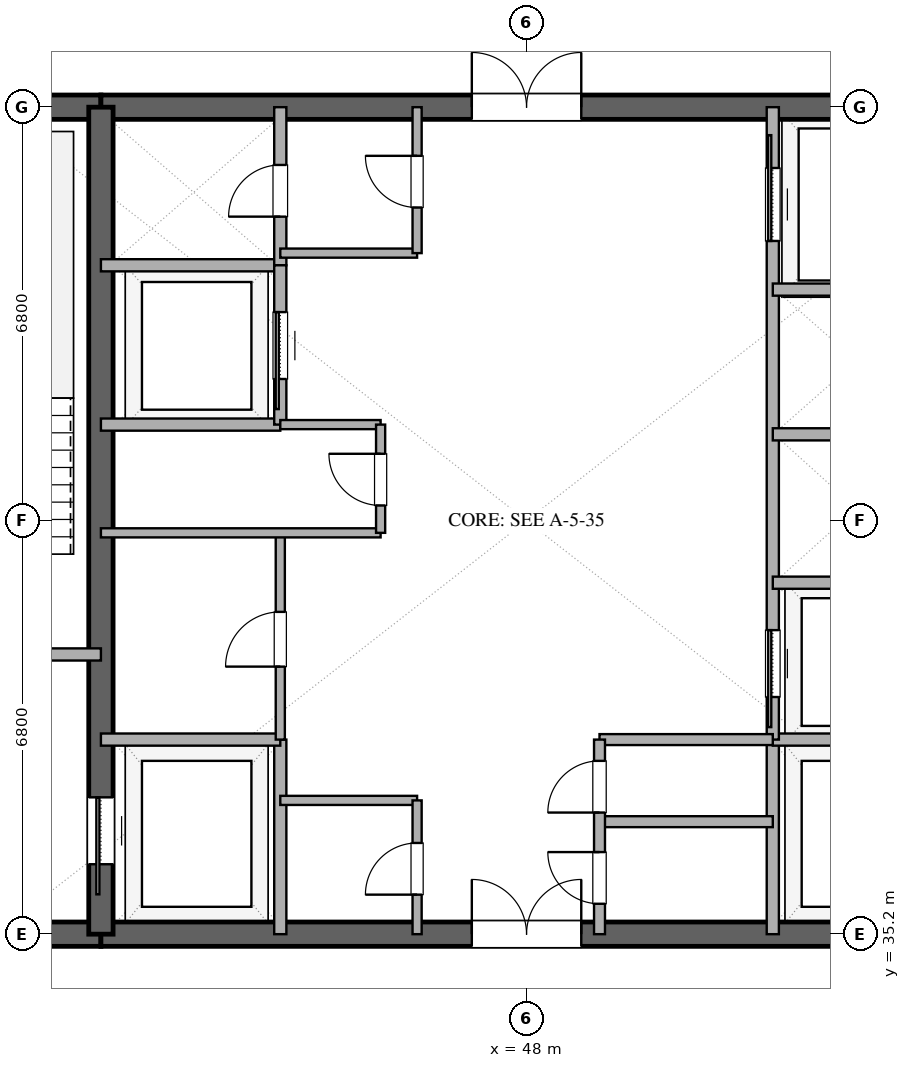
"""IFC4 building model, lengths in metres.
Left out: names, types, materials, properties, quantities, classifications, styles, units other than length and angle.
Written with IfcOpenShell. Run it as: python <this file> out.ifc"""

import sys

from ifc_helpers import new_model, si_unit, direction, frame, frame_2d, origin, place, context, subcontext, project, spatial, rectangle, extrude, element, fill, save


model = new_model("IFC4")
c1 = context("Model", 3, precision=1e-05, world=origin(), true_north=direction((0.0, 1.0)))
c2 = subcontext(c1, "Body", "Model", "MODEL_VIEW")
j1 = project(units=[si_unit("LENGTHUNIT", "METRE"), si_unit("PLANEANGLEUNIT", "RADIAN")], contexts=[c1])
p1 = place(None, origin())
s1 = spatial("IfcSite", under=j1, at=p1, CompositionType="ELEMENT")
p2 = place(p1, origin())
s2 = spatial("IfcBuilding", under=s1, at=p2, CompositionType="ELEMENT")
p3 = place(p2, frame((0.0, 0.0, 242.4)))
s3 = spatial("IfcBuildingStorey", under=s2, at=p3, CompositionType="ELEMENT", Elevation=242.4)
p4 = place(p3, frame((37.0, 35.2, 0.0), z_axis=(0.0, 0.0, 1.0), x_axis=(1.0, 0.0, 0.0)))
e1 = element("IfcWall", 1, at=p4, inside=s3, PredefinedType="SHEAR", context=c2, shape_type="SweptSolid", body=[
    extrude(rectangle(XDim=4.0, YDim=0.4, at=frame_2d((2.0, 0.0))), origin(), (0.0, 0.0, 1.0), 3.36),
])
p5 = place(p4, frame((1.4, 0.0, 0.0)))
e2 = element("IfcOpeningElement", 2, at=p5, cuts=e1, PredefinedType="OPENING", context=c2, shape_type="SweptSolid", body=[
    extrude(rectangle(XDim=1.2, YDim=2.15, at=frame_2d((0.6, 1.075))), frame((0.0, 0.21, 0.0), z_axis=(0.0, -1.0, 0.0), x_axis=(1.0, 0.0, 0.0)), (0.0, 0.0, 1.0), 0.42),
])
p6 = place(p3, frame((41.0, 35.2, 0.0), z_axis=(0.0, 0.0, 1.0), x_axis=(1.0, 0.0, 0.0)))
e3 = element("IfcWall", 3, at=p6, inside=s3, PredefinedType="SHEAR", context=c2, shape_type="SweptSolid", body=[
    extrude(rectangle(XDim=14.0, YDim=0.4, at=frame_2d((7.0, 0.0))), origin(), (0.0, 0.0, 1.0), 3.36),
])
p7 = place(p6, frame((6.1, 0.0, 0.0)))
e4 = element("IfcOpeningElement", 4, at=p7, cuts=e3, PredefinedType="OPENING", context=c2, shape_type="SweptSolid", body=[
    extrude(rectangle(XDim=1.8, YDim=2.25, at=frame_2d((0.9, 1.125))), frame((0.0, 0.21, 0.0), z_axis=(0.0, -1.0, 0.0), x_axis=(1.0, 0.0, 0.0)), (0.0, 0.0, 1.0), 0.42),
])
p8 = place(p3, frame((37.0, 48.8, 0.0), z_axis=(0.0, 0.0, 1.0), x_axis=(1.0, 0.0, 0.0)))
e5 = element("IfcWall", 5, at=p8, inside=s3, PredefinedType="SHEAR", context=c2, shape_type="SweptSolid", body=[
    extrude(rectangle(XDim=4.0, YDim=0.4, at=frame_2d((2.0, 0.0))), origin(), (0.0, 0.0, 1.0), 3.36),
])
p9 = place(p3, frame((41.0, 48.8, 0.0), z_axis=(0.0, 0.0, 1.0), x_axis=(1.0, 0.0, 0.0)))
e6 = element("IfcWall", 6, at=p9, inside=s3, PredefinedType="SHEAR", context=c2, shape_type="SweptSolid", body=[
    extrude(rectangle(XDim=14.0, YDim=0.4, at=frame_2d((7.0, 0.0))), origin(), (0.0, 0.0, 1.0), 3.36),
])
p10 = place(p9, frame((6.1, 0.0, 0.0)))
e7 = element("IfcOpeningElement", 7, at=p10, cuts=e6, PredefinedType="OPENING", context=c2, shape_type="SweptSolid", body=[
    extrude(rectangle(XDim=1.8, YDim=2.25, at=frame_2d((0.9, 1.125))), frame((0.0, 0.21, 0.0), z_axis=(0.0, -1.0, 0.0), x_axis=(1.0, 0.0, 0.0)), (0.0, 0.0, 1.0), 0.42),
])
p11 = place(p3, frame((41.0, 35.2, 0.0), z_axis=(0.0, 0.0, 1.0), x_axis=(0.0, 1.0, 0.0)))
e8 = element("IfcWall", 8, at=p11, inside=s3, PredefinedType="SHEAR", context=c2, shape_type="SweptSolid", body=[
    extrude(rectangle(XDim=13.6, YDim=0.4, at=frame_2d((6.8, 0.0))), origin(), (0.0, 0.0, 1.0), 3.36),
])
p12 = place(p11, frame((1.15, 0.0, 0.0)))
e9 = element("IfcOpeningElement", 9, at=p12, cuts=e8, PredefinedType="OPENING", context=c2, shape_type="SweptSolid", body=[
    extrude(rectangle(XDim=1.1, YDim=2.2, at=frame_2d((0.55, 1.1))), frame((0.0, 0.21, 0.0), z_axis=(0.0, -1.0, 0.0), x_axis=(1.0, 0.0, 0.0)), (0.0, 0.0, 1.0), 0.42),
])
p13 = place(p3, frame((37.0, 39.8, 0.0), z_axis=(0.0, 0.0, 1.0), x_axis=(1.0, 0.0, 0.0)))
e10 = element("IfcWall", 10, at=p13, inside=s3, PredefinedType="SOLIDWALL", context=c2, shape_type="SweptSolid", body=[
    extrude(rectangle(XDim=4.0, YDim=0.2, at=frame_2d((2.0, 0.0))), origin(), (0.0, 0.0, 1.0), 2.72),
])
p14 = place(p13, frame((1.45, 0.0, 0.0)))
e11 = element("IfcOpeningElement", 11, at=p14, cuts=e10, PredefinedType="OPENING", context=c2, shape_type="SweptSolid", body=[
    extrude(rectangle(XDim=1.1, YDim=2.15, at=frame_2d((0.55, 1.075))), frame((0.0, 0.11, 0.0), z_axis=(0.0, -1.0, 0.0), x_axis=(1.0, 0.0, 0.0)), (0.0, 0.0, 1.0), 0.22),
])
p15 = place(p3, frame((43.95, 35.2, 0.0), z_axis=(0.0, 0.0, 1.0), x_axis=(0.0, 1.0, 0.0)))
e12 = element("IfcWall", 12, at=p15, inside=s3, PredefinedType="SOLIDWALL", context=c2, shape_type="SweptSolid", body=[
    extrude(rectangle(XDim=3.2, YDim=0.2, at=frame_2d((1.6, 0.0))), origin(), (0.0, 0.0, 1.0), 2.72),
])
p16 = place(p3, frame((41.0, 38.4, 0.0), z_axis=(0.0, 0.0, 1.0), x_axis=(1.0, 0.0, 0.0)))
e13 = element("IfcWall", 13, at=p16, inside=s3, PredefinedType="SOLIDWALL", context=c2, shape_type="SweptSolid", body=[
    extrude(rectangle(XDim=2.95, YDim=0.2, at=frame_2d((1.475, 0.0))), origin(), (0.0, 0.0, 1.0), 2.72),
])
p17 = place(p3, frame((52.05, 35.2, 0.0), z_axis=(0.0, 0.0, 1.0), x_axis=(0.0, 1.0, 0.0)))
e14 = element("IfcWall", 14, at=p17, inside=s3, PredefinedType="SOLIDWALL", context=c2, shape_type="SweptSolid", body=[
    extrude(rectangle(XDim=3.2, YDim=0.2, at=frame_2d((1.6, 0.0))), origin(), (0.0, 0.0, 1.0), 2.72),
])
for number, where, z_axis, x_axis in (
    (15, (52.05, 38.4, 0.0), (0.0, 0.0, 1.0), (1.0, 0.0, 0.0)),
    (16, (41.0, 46.2, 0.0), (0.0, 0.0, 1.0), (1.0, 0.0, 0.0)),
):
    element("IfcWall", number, at=place(p3, frame(where, z_axis=z_axis, x_axis=x_axis)), inside=s3, PredefinedType="SOLIDWALL", context=c2, shape_type="SweptSolid", body=[
        extrude(rectangle(XDim=2.95, YDim=0.2, at=frame_2d((1.475, 0.0))), origin(), (0.0, 0.0, 1.0), 2.72),
    ])
p18 = place(p3, frame((43.95, 46.2, 0.0), z_axis=(0.0, 0.0, 1.0), x_axis=(0.0, 1.0, 0.0)))
e17 = element("IfcWall", 17, at=p18, inside=s3, PredefinedType="SOLIDWALL", context=c2, shape_type="SweptSolid", body=[
    extrude(rectangle(XDim=2.6, YDim=0.2, at=frame_2d((1.3, 0.0))), origin(), (0.0, 0.0, 1.0), 2.72),
])
p19 = place(p18, frame((0.8, 0.0, 0.0)))
e18 = element("IfcOpeningElement", 18, at=p19, cuts=e17, PredefinedType="OPENING", context=c2, shape_type="SweptSolid", body=[
    extrude(rectangle(XDim=0.85, YDim=2.15, at=frame_2d((0.425, 1.075))), frame((0.0, 0.11, 0.0), z_axis=(0.0, -1.0, 0.0), x_axis=(1.0, 0.0, 0.0)), (0.0, 0.0, 1.0), 0.22),
])
p20 = place(p3, frame((41.0, 43.58, 0.0), z_axis=(0.0, 0.0, 1.0), x_axis=(1.0, 0.0, 0.0)))
e19 = element("IfcWall", 19, at=p20, inside=s3, PredefinedType="SOLIDWALL", context=c2, shape_type="SweptSolid", body=[
    extrude(rectangle(XDim=2.95, YDim=0.2, at=frame_2d((1.475, 0.0))), origin(), (0.0, 0.0, 1.0), 2.72),
])
p21 = place(p3, frame((43.95, 43.58, 0.0), z_axis=(0.0, 0.0, 1.0), x_axis=(0.0, 1.0, 0.0)))
e20 = element("IfcWall", 20, at=p21, inside=s3, PredefinedType="SOLIDWALL", context=c2, shape_type="SweptSolid", body=[
    extrude(rectangle(XDim=2.62, YDim=0.2, at=frame_2d((1.31, 0.0))), origin(), (0.0, 0.0, 1.0), 2.72),
])
p22 = place(p21, frame((0.75, 0.0, 0.0)))
e21 = element("IfcOpeningElement", 21, at=p22, cuts=e20, PredefinedType="OPENING", context=c2, shape_type="SweptSolid", body=[
    extrude(rectangle(XDim=1.1, YDim=2.2, at=frame_2d((0.55, 1.1))), frame((0.0, 0.11, 0.0), z_axis=(0.0, -1.0, 0.0), x_axis=(1.0, 0.0, 0.0)), (0.0, 0.0, 1.0), 0.22),
])
p23 = place(p3, frame((43.95, 38.4, 0.0), z_axis=(0.0, 0.0, 1.0), x_axis=(0.0, 1.0, 0.0)))
e22 = element("IfcWall", 22, at=p23, inside=s3, PredefinedType="PARTITIONING", context=c2, shape_type="SweptSolid", body=[
    extrude(rectangle(XDim=3.4, YDim=0.15, at=frame_2d((1.7, 0.0))), origin(), (0.0, 0.0, 1.0), 2.72),
])
p24 = place(p23, frame((1.2, 0.0, 0.0)))
e23 = element("IfcOpeningElement", 23, at=p24, cuts=e22, PredefinedType="OPENING", context=c2, shape_type="SweptSolid", body=[
    extrude(rectangle(XDim=0.9, YDim=2.15, at=frame_2d((0.45, 1.075))), frame((0.0, 0.085, 0.0), z_axis=(0.0, -1.0, 0.0), x_axis=(1.0, 0.0, 0.0)), (0.0, 0.0, 1.0), 0.17),
])
p25 = place(p3, frame((41.0, 41.8, 0.0), z_axis=(0.0, 0.0, 1.0), x_axis=(1.0, 0.0, 0.0)))
e24 = element("IfcWall", 24, at=p25, inside=s3, PredefinedType="PARTITIONING", context=c2, shape_type="SweptSolid", body=[
    extrude(rectangle(XDim=4.6, YDim=0.15, at=frame_2d((2.3, 0.0))), origin(), (0.0, 0.0, 1.0), 2.72),
])
p26 = place(p3, frame((43.95, 43.58, 0.0), z_axis=(0.0, 0.0, 1.0), x_axis=(1.0, 0.0, 0.0)))
e25 = element("IfcWall", 25, at=p26, inside=s3, PredefinedType="PARTITIONING", context=c2, shape_type="SweptSolid", body=[
    extrude(rectangle(XDim=1.65, YDim=0.15, at=frame_2d((0.825, 0.0))), origin(), (0.0, 0.0, 1.0), 2.72),
])
p27 = place(p3, frame((45.6, 41.8, 0.0), z_axis=(0.0, 0.0, 1.0), x_axis=(0.0, 1.0, 0.0)))
e26 = element("IfcWall", 26, at=p27, inside=s3, PredefinedType="PARTITIONING", context=c2, shape_type="SweptSolid", body=[
    extrude(rectangle(XDim=1.78, YDim=0.15, at=frame_2d((0.89, 0.0))), origin(), (0.0, 0.0, 1.0), 2.72),
])
p28 = place(p27, frame((0.45, 0.0, 0.0)))
e27 = element("IfcOpeningElement", 27, at=p28, cuts=e26, PredefinedType="OPENING", context=c2, shape_type="SweptSolid", body=[
    extrude(rectangle(XDim=0.85, YDim=2.15, at=frame_2d((0.425, 1.075))), frame((0.0, 0.085, 0.0), z_axis=(0.0, -1.0, 0.0), x_axis=(1.0, 0.0, 0.0)), (0.0, 0.0, 1.0), 0.17),
])
p29 = place(p3, frame((52.05, 38.4, 0.0), z_axis=(0.0, 0.0, 1.0), x_axis=(0.0, 1.0, 0.0)))
e28 = element("IfcWall", 28, at=p29, inside=s3, PredefinedType="SOLIDWALL", context=c2, shape_type="SweptSolid", body=[
    extrude(rectangle(XDim=10.4, YDim=0.2, at=frame_2d((5.2, 0.0))), origin(), (0.0, 0.0, 1.0), 2.72),
])
p30 = place(p29, frame((0.7, 0.0, 0.0)))
e29 = element("IfcOpeningElement", 29, at=p30, cuts=e28, PredefinedType="OPENING", context=c2, shape_type="SweptSolid", body=[
    extrude(rectangle(XDim=1.1, YDim=2.2, at=frame_2d((0.55, 1.1))), frame((0.0, 0.11, 0.0), z_axis=(0.0, -1.0, 0.0), x_axis=(1.0, 0.0, 0.0)), (0.0, 0.0, 1.0), 0.22),
])
p31 = place(p29, frame((8.2, 0.0, 0.0)))
e30 = element("IfcOpeningElement", 30, at=p31, cuts=e28, PredefinedType="OPENING", context=c2, shape_type="SweptSolid", body=[
    extrude(rectangle(XDim=1.2, YDim=2.2, at=frame_2d((0.6, 1.1))), frame((0.0, 0.11, 0.0), z_axis=(0.0, -1.0, 0.0), x_axis=(1.0, 0.0, 0.0)), (0.0, 0.0, 1.0), 0.22),
])
for number, where, z_axis, x_axis in (
    (31, (52.05, 40.98, 0.0), (0.0, 0.0, 1.0), (1.0, 0.0, 0.0)),
    (32, (52.05, 43.42, 0.0), (0.0, 0.0, 1.0), (1.0, 0.0, 0.0)),
    (33, (52.05, 45.8, 0.0), (0.0, 0.0, 1.0), (1.0, 0.0, 0.0)),
):
    element("IfcWall", number, at=place(p3, frame(where, z_axis=z_axis, x_axis=x_axis)), inside=s3, PredefinedType="SOLIDWALL", context=c2, shape_type="SweptSolid", body=[
        extrude(rectangle(XDim=2.95, YDim=0.2, at=frame_2d((1.475, 0.0))), origin(), (0.0, 0.0, 1.0), 2.72),
    ])
p32 = place(p3, frame((43.95, 37.4, 0.0), z_axis=(0.0, 0.0, 1.0), x_axis=(1.0, 0.0, 0.0)))
e34 = element("IfcWall", 34, at=p32, inside=s3, PredefinedType="PARTITIONING", context=c2, shape_type="SweptSolid", body=[
    extrude(rectangle(XDim=2.25, YDim=0.15, at=frame_2d((1.125, 0.0))), origin(), (0.0, 0.0, 1.0), 2.72),
])
p33 = place(p3, frame((46.2, 35.2, 0.0), z_axis=(0.0, 0.0, 1.0), x_axis=(0.0, 1.0, 0.0)))
e35 = element("IfcWall", 35, at=p33, inside=s3, PredefinedType="PARTITIONING", context=c2, shape_type="SweptSolid", body=[
    extrude(rectangle(XDim=2.2, YDim=0.15, at=frame_2d((1.1, 0.0))), origin(), (0.0, 0.0, 1.0), 2.72),
])
p34 = place(p33, frame((0.65, 0.0, 0.0)))
e36 = element("IfcOpeningElement", 36, at=p34, cuts=e35, PredefinedType="OPENING", context=c2, shape_type="SweptSolid", body=[
    extrude(rectangle(XDim=0.85, YDim=2.15, at=frame_2d((0.425, 1.075))), frame((0.0, 0.085, 0.0), z_axis=(0.0, -1.0, 0.0), x_axis=(1.0, 0.0, 0.0)), (0.0, 0.0, 1.0), 0.17),
])
p35 = place(p3, frame((43.95, 46.4, 0.0), z_axis=(0.0, 0.0, 1.0), x_axis=(1.0, 0.0, 0.0)))
e37 = element("IfcWall", 37, at=p35, inside=s3, PredefinedType="PARTITIONING", context=c2, shape_type="SweptSolid", body=[
    extrude(rectangle(XDim=2.25, YDim=0.15, at=frame_2d((1.125, 0.0))), origin(), (0.0, 0.0, 1.0), 2.72),
])
p36 = place(p3, frame((46.2, 46.4, 0.0), z_axis=(0.0, 0.0, 1.0), x_axis=(0.0, 1.0, 0.0)))
e38 = element("IfcWall", 38, at=p36, inside=s3, PredefinedType="PARTITIONING", context=c2, shape_type="SweptSolid", body=[
    extrude(rectangle(XDim=2.4, YDim=0.15, at=frame_2d((1.2, 0.0))), origin(), (0.0, 0.0, 1.0), 2.72),
])
p37 = place(p36, frame((0.75, 0.0, 0.0)))
e39 = element("IfcOpeningElement", 39, at=p37, cuts=e38, PredefinedType="OPENING", context=c2, shape_type="SweptSolid", body=[
    extrude(rectangle(XDim=0.85, YDim=2.15, at=frame_2d((0.425, 1.075))), frame((0.0, 0.085, 0.0), z_axis=(0.0, -1.0, 0.0), x_axis=(1.0, 0.0, 0.0)), (0.0, 0.0, 1.0), 0.17),
])
for number, where, z_axis, x_axis in (
    (40, (49.2, 37.05, 0.0), (0.0, 0.0, 1.0), (1.0, 0.0, 0.0)),
    (41, (49.2, 38.4, 0.0), (0.0, 0.0, 1.0), (1.0, 0.0, 0.0)),
):
    element("IfcWall", number, at=place(p3, frame(where, z_axis=z_axis, x_axis=x_axis)), inside=s3, PredefinedType="PLUMBINGWALL", context=c2, shape_type="SweptSolid", body=[
        extrude(rectangle(XDim=2.85, YDim=0.18, at=frame_2d((1.425, 0.0))), origin(), (0.0, 0.0, 1.0), 2.72),
    ])
p38 = place(p3, frame((49.2, 35.2, 0.0), z_axis=(0.0, 0.0, 1.0), x_axis=(0.0, 1.0, 0.0)))
e42 = element("IfcWall", 42, at=p38, inside=s3, PredefinedType="PLUMBINGWALL", context=c2, shape_type="SweptSolid", body=[
    extrude(rectangle(XDim=3.2, YDim=0.18, at=frame_2d((1.6, 0.0))), origin(), (0.0, 0.0, 1.0), 2.72),
])
p39 = place(p38, frame((0.5, 0.0, 0.0)))
e43 = element("IfcOpeningElement", 43, at=p39, cuts=e42, PredefinedType="OPENING", context=c2, shape_type="SweptSolid", body=[
    extrude(rectangle(XDim=0.85, YDim=2.1, at=frame_2d((0.425, 1.05))), frame((0.0, 0.1, 0.0), z_axis=(0.0, -1.0, 0.0), x_axis=(1.0, 0.0, 0.0)), (0.0, 0.0, 1.0), 0.2),
])
p40 = place(p38, frame((2.0, 0.0, 0.0)))
e44 = element("IfcOpeningElement", 44, at=p40, cuts=e42, PredefinedType="OPENING", context=c2, shape_type="SweptSolid", body=[
    extrude(rectangle(XDim=0.85, YDim=2.15, at=frame_2d((0.425, 1.075))), frame((0.0, 0.1, 0.0), z_axis=(0.0, -1.0, 0.0), x_axis=(1.0, 0.0, 0.0)), (0.0, 0.0, 1.0), 0.2),
])
p41 = place(p12, origin())
e45 = element("IfcDoor", 45, at=p41, inside=s3, OperationType="SLIDING_TO_LEFT", PredefinedType="DOOR", context=c2, shape_type="SweptSolid", body=[
    extrude(rectangle(XDim=1.1, YDim=2.2, at=frame_2d((0.55, 1.1))), frame((0.0, 0.025, 0.0), z_axis=(0.0, -1.0, 0.0), x_axis=(1.0, 0.0, 0.0)), (0.0, 0.0, 1.0), 0.05),
])
fill(e9, e45)
p42 = place(p7, origin())
e46 = element("IfcDoor", 46, at=p42, inside=s3, OperationType="DOUBLE_DOOR_SINGLE_SWING", PredefinedType="DOOR", context=c2, shape_type="SweptSolid", body=[
    extrude(rectangle(XDim=1.8, YDim=2.25, at=frame_2d((0.9, 1.125))), frame((0.0, 0.025, 0.0), z_axis=(0.0, -1.0, 0.0), x_axis=(1.0, 0.0, 0.0)), (0.0, 0.0, 1.0), 0.05),
])
fill(e4, e46)
p43 = place(p10, origin())
e47 = element("IfcDoor", 47, at=p43, inside=s3, OperationType="DOUBLE_DOOR_SINGLE_SWING", PredefinedType="DOOR", context=c2, shape_type="SweptSolid", body=[
    extrude(rectangle(XDim=1.8, YDim=2.25, at=frame_2d((0.9, 1.125))), frame((0.0, 0.025, 0.0), z_axis=(0.0, -1.0, 0.0), x_axis=(1.0, 0.0, 0.0)), (0.0, 0.0, 1.0), 0.05),
])
fill(e7, e47)
p44 = place(p19, origin())
e48 = element("IfcDoor", 48, at=p44, inside=s3, OperationType="SINGLE_SWING_LEFT", PredefinedType="DOOR", context=c2, shape_type="SweptSolid", body=[
    extrude(rectangle(XDim=0.85, YDim=2.15, at=frame_2d((0.425, 1.075))), frame((0.0, 0.025, 0.0), z_axis=(0.0, -1.0, 0.0), x_axis=(1.0, 0.0, 0.0)), (0.0, 0.0, 1.0), 0.05),
])
fill(e18, e48)
p45 = place(p22, origin())
e49 = element("IfcDoor", 49, at=p45, inside=s3, OperationType="SLIDING_TO_LEFT", PredefinedType="DOOR", context=c2, shape_type="SweptSolid", body=[
    extrude(rectangle(XDim=1.1, YDim=2.2, at=frame_2d((0.55, 1.1))), frame((0.0, 0.025, 0.0), z_axis=(0.0, -1.0, 0.0), x_axis=(1.0, 0.0, 0.0)), (0.0, 0.0, 1.0), 0.05),
])
fill(e21, e49)
p46 = place(p24, origin())
e50 = element("IfcDoor", 50, at=p46, inside=s3, OperationType="SINGLE_SWING_LEFT", PredefinedType="DOOR", context=c2, shape_type="SweptSolid", body=[
    extrude(rectangle(XDim=0.9, YDim=2.15, at=frame_2d((0.45, 1.075))), frame((0.0, 0.025, 0.0), z_axis=(0.0, -1.0, 0.0), x_axis=(1.0, 0.0, 0.0)), (0.0, 0.0, 1.0), 0.05),
])
fill(e23, e50)
p47 = place(p28, origin())
e51 = element("IfcDoor", 51, at=p47, inside=s3, OperationType="SINGLE_SWING_RIGHT", PredefinedType="DOOR", context=c2, shape_type="SweptSolid", body=[
    extrude(rectangle(XDim=0.85, YDim=2.15, at=frame_2d((0.425, 1.075))), frame((0.0, 0.025, 0.0), z_axis=(0.0, -1.0, 0.0), x_axis=(1.0, 0.0, 0.0)), (0.0, 0.0, 1.0), 0.05),
])
fill(e27, e51)
p48 = place(p30, origin())
e52 = element("IfcDoor", 52, at=p48, inside=s3, OperationType="SLIDING_TO_LEFT", PredefinedType="DOOR", context=c2, shape_type="SweptSolid", body=[
    extrude(rectangle(XDim=1.1, YDim=2.2, at=frame_2d((0.55, 1.1))), frame((0.0, 0.025, 0.0), z_axis=(0.0, -1.0, 0.0), x_axis=(1.0, 0.0, 0.0)), (0.0, 0.0, 1.0), 0.05),
])
fill(e29, e52)
p49 = place(p31, origin())
e53 = element("IfcDoor", 53, at=p49, inside=s3, OperationType="SLIDING_TO_RIGHT", PredefinedType="DOOR", context=c2, shape_type="SweptSolid", body=[
    extrude(rectangle(XDim=1.2, YDim=2.2, at=frame_2d((0.6, 1.1))), frame((0.0, 0.025, 0.0), z_axis=(0.0, -1.0, 0.0), x_axis=(1.0, 0.0, 0.0)), (0.0, 0.0, 1.0), 0.05),
])
fill(e30, e53)
p50 = place(p34, origin())
e54 = element("IfcDoor", 54, at=p50, inside=s3, OperationType="SINGLE_SWING_LEFT", PredefinedType="DOOR", context=c2, shape_type="SweptSolid", body=[
    extrude(rectangle(XDim=0.85, YDim=2.15, at=frame_2d((0.425, 1.075))), frame((0.0, 0.025, 0.0), z_axis=(0.0, -1.0, 0.0), x_axis=(1.0, 0.0, 0.0)), (0.0, 0.0, 1.0), 0.05),
])
fill(e36, e54)
p51 = place(p37, origin())
e55 = element("IfcDoor", 55, at=p51, inside=s3, OperationType="SINGLE_SWING_RIGHT", PredefinedType="DOOR", context=c2, shape_type="SweptSolid", body=[
    extrude(rectangle(XDim=0.85, YDim=2.15, at=frame_2d((0.425, 1.075))), frame((0.0, 0.025, 0.0), z_axis=(0.0, -1.0, 0.0), x_axis=(1.0, 0.0, 0.0)), (0.0, 0.0, 1.0), 0.05),
])
fill(e39, e55)
p52 = place(p39, origin())
e56 = element("IfcDoor", 56, at=p52, inside=s3, OperationType="SINGLE_SWING_RIGHT", PredefinedType="DOOR", context=c2, shape_type="SweptSolid", body=[
    extrude(rectangle(XDim=0.85, YDim=2.1, at=frame_2d((0.425, 1.05))), frame((0.0, 0.025, 0.0), z_axis=(0.0, -1.0, 0.0), x_axis=(1.0, 0.0, 0.0)), (0.0, 0.0, 1.0), 0.05),
])
fill(e43, e56)
p53 = place(p40, origin())
e57 = element("IfcDoor", 57, at=p53, inside=s3, OperationType="SINGLE_SWING_LEFT", PredefinedType="DOOR", context=c2, shape_type="SweptSolid", body=[
    extrude(rectangle(XDim=0.85, YDim=2.15, at=frame_2d((0.425, 1.075))), frame((0.0, 0.025, 0.0), z_axis=(0.0, -1.0, 0.0), x_axis=(1.0, 0.0, 0.0)), (0.0, 0.0, 1.0), 0.05),
])
fill(e44, e57)
save(model, sys.argv[1])
